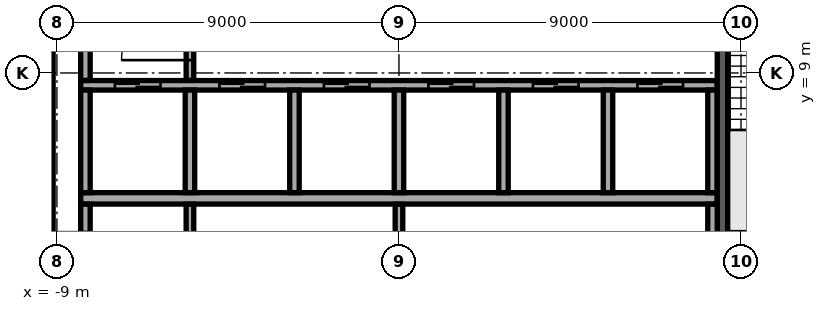
"""IFC4 building model, lengths in metres.
Left out: names, types, materials, properties, quantities, classifications, styles, units other than length and angle.
Written with IfcOpenShell. Run it as: python <this file> out.ifc"""

import sys

from ifc_helpers import new_model, si_unit, direction, frame, frame_2d, origin, place, context, subcontext, project, spatial, rectangle, extrude, element, fill, save


model = new_model("IFC4")
c1 = context("Model", 3, precision=1e-05, world=origin(), true_north=direction((0.0, 1.0)))
c2 = subcontext(c1, "Body", "Model", "MODEL_VIEW")
j1 = project(units=[si_unit("LENGTHUNIT", "METRE"), si_unit("PLANEANGLEUNIT", "RADIAN")], contexts=[c1])
p1 = place(None, origin())
s1 = spatial("IfcSite", under=j1, at=p1, CompositionType="ELEMENT")
p2 = place(p1, origin())
s2 = spatial("IfcBuilding", under=s1, at=p2, CompositionType="ELEMENT")
p3 = place(p2, frame((0.0, 0.0, 282.9)))
s3 = spatial("IfcBuildingStorey", under=s2, at=p3, CompositionType="ELEMENT", Elevation=282.9)
p4 = place(p3, frame((-8.375, 5.7, 0.0), z_axis=(0.0, 0.0, 1.0), x_axis=(1.0, 0.0, 0.0)))
e1 = element("IfcWall", 1, at=p4, inside=s3, PredefinedType="SOLIDWALL", context=c2, shape_type="SweptSolid", body=[
    extrude(rectangle(XDim=16.75, YDim=0.3, at=frame_2d((8.375, 0.0))), origin(), (0.0, 0.0, 1.0), 3.64),
])
p5 = place(p3, frame((-8.375, 8.675, 0.0), z_axis=(0.0, 0.0, 1.0), x_axis=(1.0, 0.0, 0.0)))
e2 = element("IfcWall", 2, at=p5, inside=s3, PredefinedType="SOLIDWALL", context=c2, shape_type="SweptSolid", body=[
    extrude(rectangle(XDim=16.75, YDim=0.25, at=frame_2d((8.375, 0.0))), origin(), (0.0, 0.0, 1.0), 3.64),
])
p6 = place(p5, frame((0.9, 0.0, 0.0)))
e3 = element("IfcOpeningElement", 3, at=p6, cuts=e2, PredefinedType="OPENING", context=c2, shape_type="SweptSolid", body=[
    extrude(rectangle(XDim=1.2, YDim=2.1, at=frame_2d((0.6, 1.05))), frame((0.0, 0.135, 0.0), z_axis=(0.0, -1.0, 0.0), x_axis=(1.0, 0.0, 0.0)), (0.0, 0.0, 1.0), 0.27),
])
p7 = place(p5, frame((3.65, 0.0, 0.0)))
e4 = element("IfcOpeningElement", 4, at=p7, cuts=e2, PredefinedType="OPENING", context=c2, shape_type="SweptSolid", body=[
    extrude(rectangle(XDim=1.2, YDim=2.1, at=frame_2d((0.6, 1.05))), frame((0.0, 0.135, 0.0), z_axis=(0.0, -1.0, 0.0), x_axis=(1.0, 0.0, 0.0)), (0.0, 0.0, 1.0), 0.27),
])
p8 = place(p5, frame((6.4, 0.0, 0.0)))
e5 = element("IfcOpeningElement", 5, at=p8, cuts=e2, PredefinedType="OPENING", context=c2, shape_type="SweptSolid", body=[
    extrude(rectangle(XDim=1.2, YDim=2.1, at=frame_2d((0.6, 1.05))), frame((0.0, 0.135, 0.0), z_axis=(0.0, -1.0, 0.0), x_axis=(1.0, 0.0, 0.0)), (0.0, 0.0, 1.0), 0.27),
])
p9 = place(p5, frame((9.15, 0.0, 0.0)))
e6 = element("IfcOpeningElement", 6, at=p9, cuts=e2, PredefinedType="OPENING", context=c2, shape_type="SweptSolid", body=[
    extrude(rectangle(XDim=1.2, YDim=2.1, at=frame_2d((0.6, 1.05))), frame((0.0, 0.135, 0.0), z_axis=(0.0, -1.0, 0.0), x_axis=(1.0, 0.0, 0.0)), (0.0, 0.0, 1.0), 0.27),
])
p10 = place(p5, frame((11.9, 0.0, 0.0)))
e7 = element("IfcOpeningElement", 7, at=p10, cuts=e2, PredefinedType="OPENING", context=c2, shape_type="SweptSolid", body=[
    extrude(rectangle(XDim=1.2, YDim=2.1, at=frame_2d((0.6, 1.05))), frame((0.0, 0.135, 0.0), z_axis=(0.0, -1.0, 0.0), x_axis=(1.0, 0.0, 0.0)), (0.0, 0.0, 1.0), 0.27),
])
p11 = place(p5, frame((14.65, 0.0, 0.0)))
e8 = element("IfcOpeningElement", 8, at=p11, cuts=e2, PredefinedType="OPENING", context=c2, shape_type="SweptSolid", body=[
    extrude(rectangle(XDim=1.2, YDim=2.1, at=frame_2d((0.6, 1.05))), frame((0.0, 0.135, 0.0), z_axis=(0.0, -1.0, 0.0), x_axis=(1.0, 0.0, 0.0)), (0.0, 0.0, 1.0), 0.27),
])
for number, where, z_axis, x_axis in (
    (9, (-8.25, 5.85, 0.0), (0.0, 0.0, 1.0), (0.0, 1.0, 0.0)),
    (10, (-5.5, 5.85, 0.0), (0.0, 0.0, 1.0), (0.0, 1.0, 0.0)),
    (11, (-2.75, 5.85, 0.0), (0.0, 0.0, 1.0), (0.0, 1.0, 0.0)),
    (12, (0.0, 5.85, 0.0), (0.0, 0.0, 1.0), (0.0, 1.0, 0.0)),
    (13, (2.75, 5.85, 0.0), (0.0, 0.0, 1.0), (0.0, 1.0, 0.0)),
    (14, (5.5, 5.85, 0.0), (0.0, 0.0, 1.0), (0.0, 1.0, 0.0)),
    (15, (8.25, 5.85, 0.0), (0.0, 0.0, 1.0), (0.0, 1.0, 0.0)),
):
    element("IfcWall", number, at=place(p3, frame(where, z_axis=z_axis, x_axis=x_axis)), inside=s3, PredefinedType="SOLIDWALL", context=c2, shape_type="SweptSolid", body=[
        extrude(rectangle(XDim=2.7, YDim=0.25, at=frame_2d((1.35, 0.0))), origin(), (0.0, 0.0, 1.0), 3.64),
    ])
p12 = place(p3, frame((8.512, 4.55, 0.0), z_axis=(0.0, 0.0, 1.0), x_axis=(0.0, 1.0, 0.0)))
e16 = element("IfcWall", 16, at=p12, inside=s3, PredefinedType="SOLIDWALL", context=c2, shape_type="SweptSolid", body=[
    extrude(rectangle(XDim=7.25, YDim=0.275, at=frame_2d((3.625, 0.0))), origin(), (0.0, 0.0, 1.0), 3.64),
])
p13 = place(p12, frame((6.0, 0.0, 0.0)))
e17 = element("IfcOpeningElement", 17, at=p13, cuts=e16, PredefinedType="OPENING", context=c2, shape_type="SweptSolid", body=[
    extrude(rectangle(XDim=1.0, YDim=2.1, at=frame_2d((0.5, 1.05))), frame((0.0, 0.147, 0.0), z_axis=(0.0, -1.0, 0.0), x_axis=(1.0, 0.0, 0.0)), (0.0, 0.0, 1.0), 0.295),
])
for number, where, z_axis, x_axis in (
    (18, (-5.5, 2.855, 0.0), (0.0, 0.0, 1.0), (0.0, 1.0, 0.0)),
    (19, (0.0, 2.855, 0.0), (0.0, 0.0, 1.0), (0.0, 1.0, 0.0)),
):
    element("IfcWall", number, at=place(p3, frame(where, z_axis=z_axis, x_axis=x_axis)), inside=s3, PredefinedType="PARTITIONING", context=c2, shape_type="SweptSolid", body=[
        extrude(rectangle(XDim=2.69, YDim=0.2, at=frame_2d((1.345, 0.0))), origin(), (0.0, 0.0, 1.0), 3.64),
    ])
p14 = place(p3, frame((8.25, 2.855, 0.0), z_axis=(0.0, 0.0, 1.0), x_axis=(0.0, 1.0, 0.0)))
e20 = element("IfcWall", 20, at=p14, inside=s3, PredefinedType="PARTITIONING", context=c2, shape_type="SweptSolid", body=[
    extrude(rectangle(XDim=2.69, YDim=0.25, at=frame_2d((1.345, 0.0))), origin(), (0.0, 0.0, 1.0), 3.64),
])
p15 = place(p3, frame((-9.2, 4.78, 0.0), z_axis=(0.0, 0.0, 1.0), x_axis=(0.0, 1.0, 0.0)))
e21 = element("IfcWall", 21, at=p15, inside=s3, PredefinedType="PARTITIONING", context=c2, shape_type="SweptSolid", body=[
    extrude(rectangle(XDim=7.015, YDim=0.2, at=frame_2d((3.507, 0.0))), origin(), (0.0, 0.0, 1.0), 3.64),
])
p16 = place(p15, frame((2.92, 0.0, 0.0)))
e22 = element("IfcOpeningElement", 22, at=p16, cuts=e21, PredefinedType="OPENING", context=c2, shape_type="SweptSolid", body=[
    extrude(rectangle(XDim=1.0, YDim=2.1, at=frame_2d((0.5, 1.05))), frame((0.0, 0.11, 0.0), z_axis=(0.0, -1.0, 0.0), x_axis=(1.0, 0.0, 0.0)), (0.0, 0.0, 1.0), 0.22),
])
p17 = place(p3, frame((-8.25, 4.78, 0.0), z_axis=(0.0, 0.0, 1.0), x_axis=(0.0, 1.0, 0.0)))
e23 = element("IfcWall", 23, at=p17, inside=s3, PredefinedType="PARTITIONING", context=c2, shape_type="SweptSolid", body=[
    extrude(rectangle(XDim=0.765, YDim=0.25, at=frame_2d((0.382, 0.0))), origin(), (0.0, 0.0, 1.0), 3.64),
])
p18 = place(p3, frame((-8.25, 8.805, 0.0), z_axis=(0.0, 0.0, 1.0), x_axis=(0.0, 1.0, 0.0)))
e24 = element("IfcWall", 24, at=p18, inside=s3, PredefinedType="PARTITIONING", context=c2, shape_type="SweptSolid", body=[
    extrude(rectangle(XDim=2.99, YDim=0.25, at=frame_2d((1.495, 0.0))), origin(), (0.0, 0.0, 1.0), 3.64),
])
p19 = place(p18, frame((0.895, 0.0, 0.0)))
e25 = element("IfcOpeningElement", 25, at=p19, cuts=e24, PredefinedType="OPENING", context=c2, shape_type="SweptSolid", body=[
    extrude(rectangle(XDim=1.0, YDim=2.1, at=frame_2d((0.5, 1.05))), frame((0.0, 0.135, 0.0), z_axis=(0.0, -1.0, 0.0), x_axis=(1.0, 0.0, 0.0)), (0.0, 0.0, 1.0), 0.27),
])
p20 = place(p3, frame((-5.5, 8.805, 0.0), z_axis=(0.0, 0.0, 1.0), x_axis=(0.0, 1.0, 0.0)))
e26 = element("IfcWall", 26, at=p20, inside=s3, PredefinedType="PARTITIONING", context=c2, shape_type="SweptSolid", body=[
    extrude(rectangle(XDim=2.99, YDim=0.2, at=frame_2d((1.495, 0.0))), origin(), (0.0, 0.0, 1.0), 3.64),
])
p21 = place(p20, frame((0.532, 0.0, 0.0)))
e27 = element("IfcOpeningElement", 27, at=p21, cuts=e26, PredefinedType="OPENING", context=c2, shape_type="SweptSolid", body=[
    extrude(rectangle(XDim=1.8, YDim=2.1, at=frame_2d((0.9, 1.05))), frame((0.0, 0.11, 0.0), z_axis=(0.0, -1.0, 0.0), x_axis=(1.0, 0.0, 0.0)), (0.0, 0.0, 1.0), 0.22),
])
p22 = place(p3, frame((-9.104, 26.104, 0.0), z_axis=(0.0, 0.0, 1.0), x_axis=(0.898795233888, -0.438368711864, 0.0)))
e28 = element("IfcWall", 28, at=p22, inside=s3, PredefinedType="PARTITIONING", context=c2, shape_type="SweptSolid", body=[
    extrude(rectangle(XDim=39.325, YDim=0.15, at=frame_2d((19.663, 0.0))), origin(), (0.0, 0.0, 1.0), 3.04),
])
p23 = place(p22, frame((2.8, 0.0, 0.0)))
e29 = element("IfcOpeningElement", 29, at=p23, cuts=e28, PredefinedType="OPENING", context=c2, shape_type="SweptSolid", body=[
    extrude(rectangle(XDim=1.8, YDim=2.1, at=frame_2d((0.9, 1.05))), frame((0.0, 0.085, 0.0), z_axis=(0.0, -1.0, 0.0), x_axis=(1.0, 0.0, 0.0)), (0.0, 0.0, 1.0), 0.17),
])
p24 = place(p22, frame((15.419, 0.0, 0.0)))
e30 = element("IfcOpeningElement", 30, at=p24, cuts=e28, PredefinedType="OPENING", context=c2, shape_type="SweptSolid", body=[
    extrude(rectangle(XDim=1.0, YDim=2.1, at=frame_2d((0.5, 1.05))), frame((0.0, 0.085, 0.0), z_axis=(0.0, -1.0, 0.0), x_axis=(1.0, 0.0, 0.0)), (0.0, 0.0, 1.0), 0.17),
])
p25 = place(p22, frame((19.371, 0.0, 0.0)))
e31 = element("IfcOpeningElement", 31, at=p25, cuts=e28, PredefinedType="OPENING", context=c2, shape_type="SweptSolid", body=[
    extrude(rectangle(XDim=1.0, YDim=2.1, at=frame_2d((0.5, 1.05))), frame((0.0, 0.085, 0.0), z_axis=(0.0, -1.0, 0.0), x_axis=(1.0, 0.0, 0.0)), (0.0, 0.0, 1.0), 0.17),
])
p26 = place(p6, origin())
e32 = element("IfcDoor", 32, at=p26, inside=s3, OperationType="DOUBLE_DOOR_SLIDING", PredefinedType="DOOR", context=c2, shape_type="SweptSolid", body=[
    extrude(rectangle(XDim=1.2, YDim=2.1, at=frame_2d((0.6, 1.05))), frame((0.0, 0.025, 0.0), z_axis=(0.0, -1.0, 0.0), x_axis=(1.0, 0.0, 0.0)), (0.0, 0.0, 1.0), 0.05),
])
fill(e3, e32)
p27 = place(p7, origin())
e33 = element("IfcDoor", 33, at=p27, inside=s3, OperationType="DOUBLE_DOOR_SLIDING", PredefinedType="DOOR", context=c2, shape_type="SweptSolid", body=[
    extrude(rectangle(XDim=1.2, YDim=2.1, at=frame_2d((0.6, 1.05))), frame((0.0, 0.025, 0.0), z_axis=(0.0, -1.0, 0.0), x_axis=(1.0, 0.0, 0.0)), (0.0, 0.0, 1.0), 0.05),
])
fill(e4, e33)
p28 = place(p8, origin())
e34 = element("IfcDoor", 34, at=p28, inside=s3, OperationType="DOUBLE_DOOR_SLIDING", PredefinedType="DOOR", context=c2, shape_type="SweptSolid", body=[
    extrude(rectangle(XDim=1.2, YDim=2.1, at=frame_2d((0.6, 1.05))), frame((0.0, 0.025, 0.0), z_axis=(0.0, -1.0, 0.0), x_axis=(1.0, 0.0, 0.0)), (0.0, 0.0, 1.0), 0.05),
])
fill(e5, e34)
p29 = place(p9, origin())
e35 = element("IfcDoor", 35, at=p29, inside=s3, OperationType="DOUBLE_DOOR_SLIDING", PredefinedType="DOOR", context=c2, shape_type="SweptSolid", body=[
    extrude(rectangle(XDim=1.2, YDim=2.1, at=frame_2d((0.6, 1.05))), frame((0.0, 0.025, 0.0), z_axis=(0.0, -1.0, 0.0), x_axis=(1.0, 0.0, 0.0)), (0.0, 0.0, 1.0), 0.05),
])
fill(e6, e35)
p30 = place(p10, origin())
e36 = element("IfcDoor", 36, at=p30, inside=s3, OperationType="DOUBLE_DOOR_SLIDING", PredefinedType="DOOR", context=c2, shape_type="SweptSolid", body=[
    extrude(rectangle(XDim=1.2, YDim=2.1, at=frame_2d((0.6, 1.05))), frame((0.0, 0.025, 0.0), z_axis=(0.0, -1.0, 0.0), x_axis=(1.0, 0.0, 0.0)), (0.0, 0.0, 1.0), 0.05),
])
fill(e7, e36)
p31 = place(p11, origin())
e37 = element("IfcDoor", 37, at=p31, inside=s3, OperationType="DOUBLE_DOOR_SLIDING", PredefinedType="DOOR", context=c2, shape_type="SweptSolid", body=[
    extrude(rectangle(XDim=1.2, YDim=2.1, at=frame_2d((0.6, 1.05))), frame((0.0, 0.025, 0.0), z_axis=(0.0, -1.0, 0.0), x_axis=(1.0, 0.0, 0.0)), (0.0, 0.0, 1.0), 0.05),
])
fill(e8, e37)
p32 = place(p21, origin())
e38 = element("IfcDoor", 38, at=p32, inside=s3, OperationType="SINGLE_SWING_LEFT", PredefinedType="DOOR", context=c2, shape_type="SweptSolid", body=[
    extrude(rectangle(XDim=1.8, YDim=2.1, at=frame_2d((0.9, 1.05))), frame((0.0, 0.025, 0.0), z_axis=(0.0, -1.0, 0.0), x_axis=(1.0, 0.0, 0.0)), (0.0, 0.0, 1.0), 0.05),
])
fill(e27, e38)
save(model, sys.argv[1])
